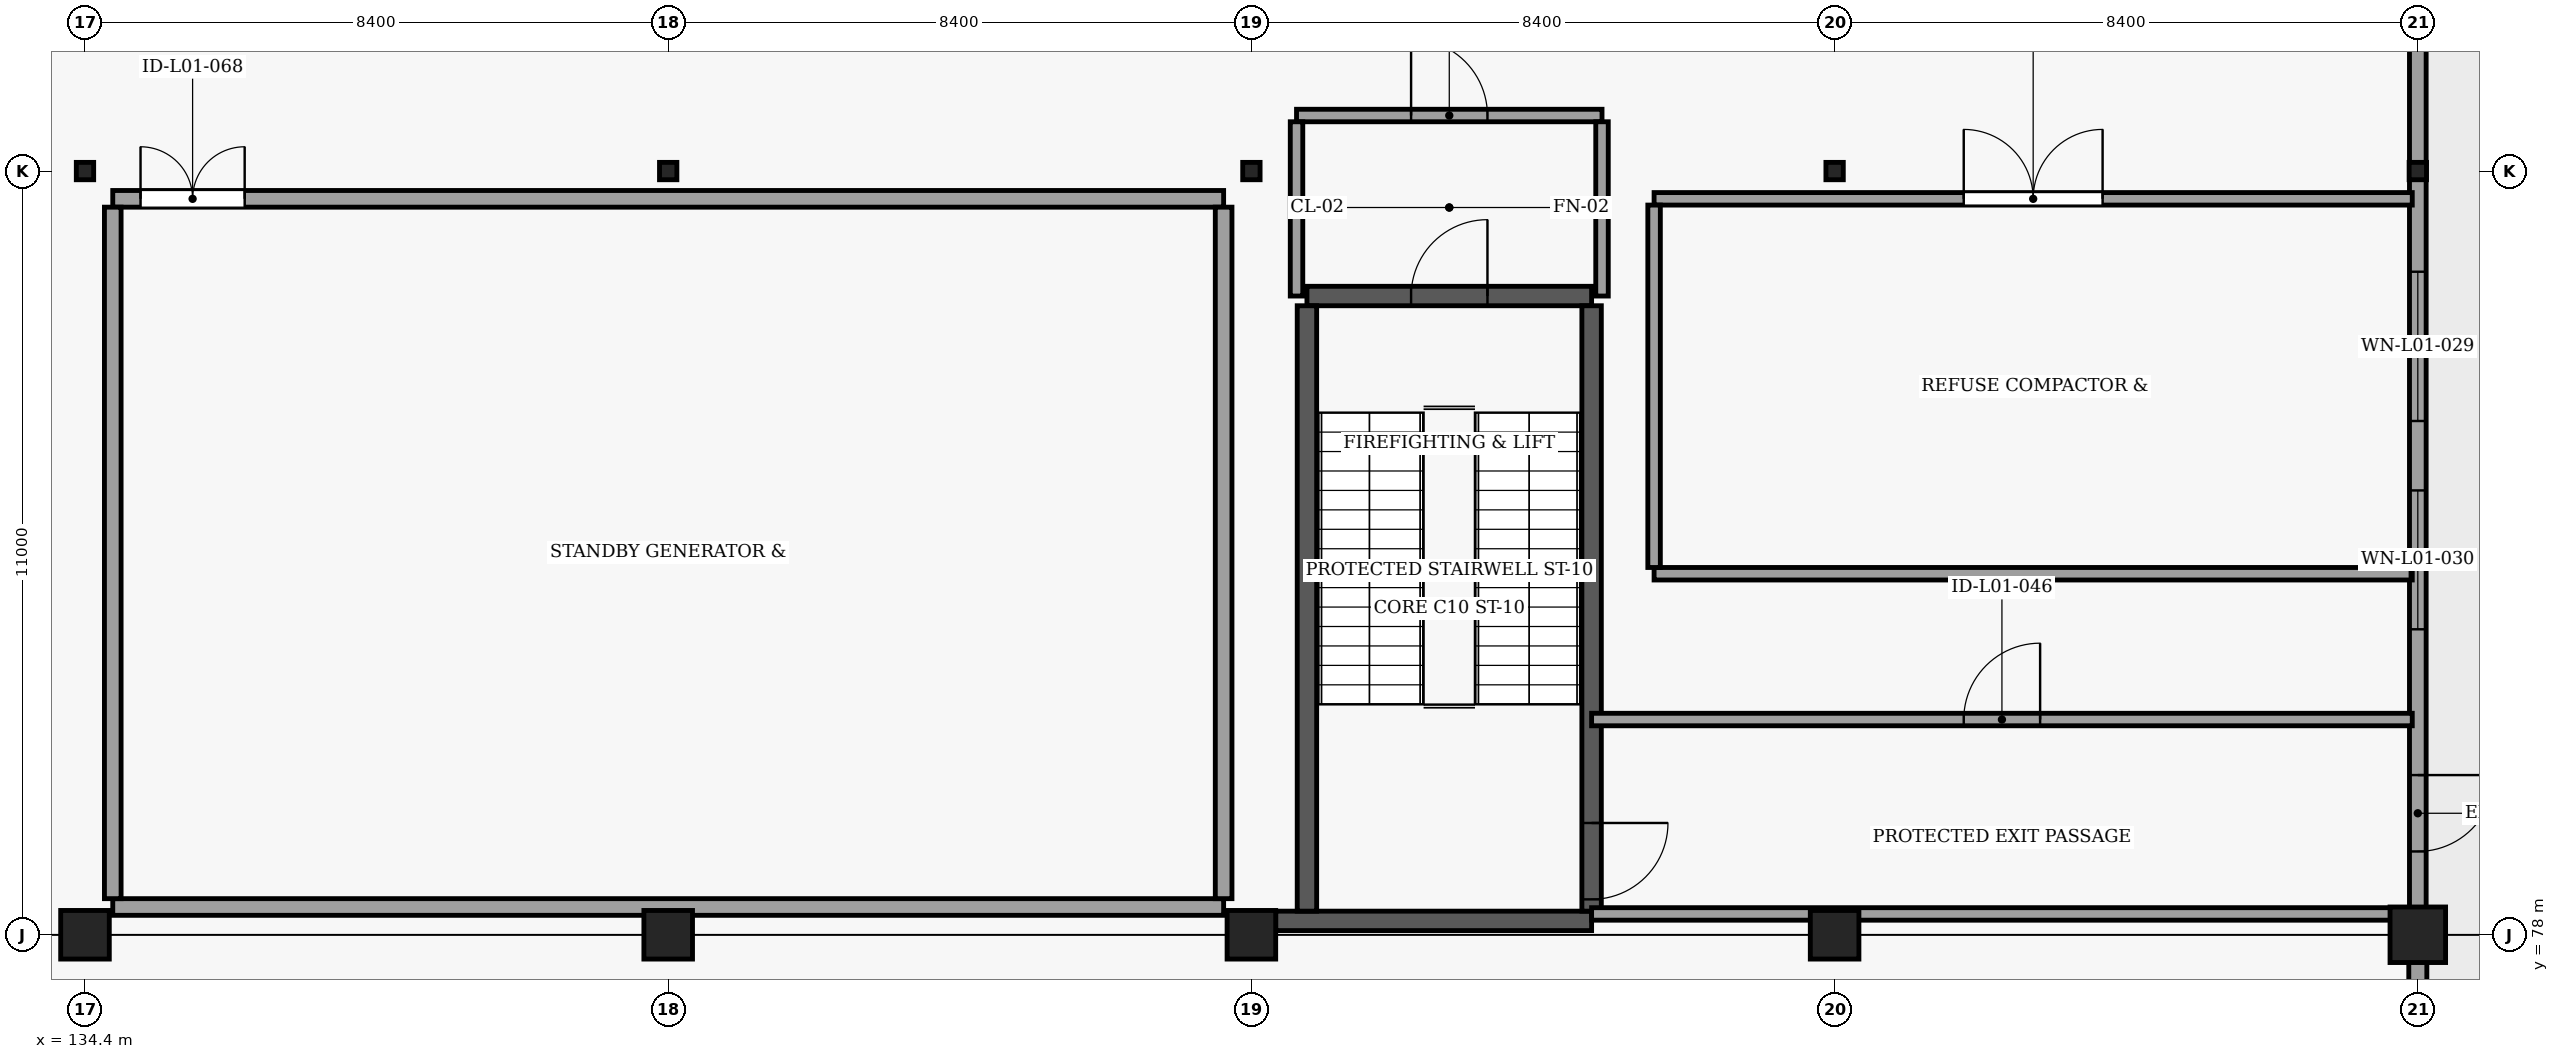
"""IFC4 building model, lengths in metres.
Left out: names, types, materials, properties, quantities, classifications, styles, units other than length and angle.
Written with IfcOpenShell. Run it as: python <this file> out.ifc"""

import sys

from ifc_helpers import new_model, si_unit, direction, frame, frame_2d, origin, origin_2d, place, context, subcontext, project, spatial, rectangle, hollow_rectangle, extrude, element, fill, save


model = new_model("IFC4")
c1 = context("Model", 3, precision=1e-05, world=origin(), true_north=direction((0.0, 1.0)))
c2 = subcontext(c1, "Body", "Model", "MODEL_VIEW")
j1 = project(units=[si_unit("LENGTHUNIT", "METRE"), si_unit("PLANEANGLEUNIT", "RADIAN")], contexts=[c1])
p1 = place(None, origin())
s1 = spatial("IfcSite", under=j1, at=p1, CompositionType="ELEMENT")
p2 = place(p1, origin())
s2 = spatial("IfcBuilding", under=s1, at=p2, CompositionType="ELEMENT")
p3 = place(p2, origin())
s3 = spatial("IfcBuildingStorey", under=s2, at=p3, CompositionType="ELEMENT", Elevation=0.0)
for number, where, z_axis, x_axis in (
    (1, (134.4, 78.0, -0.45), (0.0, 0.0, 1.0), (1.0, 0.0, 0.0)),
    (2, (142.8, 78.0, -0.45), (0.0, 0.0, 1.0), (1.0, 0.0, 0.0)),
    (3, (151.2, 78.0, -0.45), (0.0, 0.0, 1.0), (1.0, 0.0, 0.0)),
    (4, (159.6, 78.0, -0.45), (0.0, 0.0, 1.0), (1.0, 0.0, 0.0)),
):
    element("IfcColumn", number, at=place(p3, frame(where, z_axis=z_axis, x_axis=x_axis)), inside=s3, PredefinedType="COLUMN", context=c2, shape_type="SweptSolid", body=[
        extrude(rectangle(XDim=0.7, YDim=0.7, at=origin_2d()), origin(), (0.0, 0.0, 1.0), 5.57),
    ])
p4 = place(p3, frame((168.0, 78.0, -0.45), z_axis=(0.0, 0.0, 1.0), x_axis=(1.0, 0.0, 0.0)))
e5 = element("IfcColumn", 5, at=p4, inside=s3, PredefinedType="COLUMN", context=c2, shape_type="SweptSolid", body=[
    extrude(rectangle(XDim=0.8, YDim=0.8, at=origin_2d()), origin(), (0.0, 0.0, 1.0), 5.57),
])
for number, where, z_axis, x_axis in (
    (6, (134.4, 89.0, -0.45), (0.0, 0.0, 1.0), (1.0, 0.0, 0.0)),
    (7, (142.8, 89.0, -0.45), (0.0, 0.0, 1.0), (1.0, 0.0, 0.0)),
    (8, (151.2, 89.0, -0.45), (0.0, 0.0, 1.0), (1.0, 0.0, 0.0)),
    (9, (159.6, 89.0, -0.45), (0.0, 0.0, 1.0), (1.0, 0.0, 0.0)),
    (10, (168.0, 89.0, -0.45), (0.0, 0.0, 1.0), (1.0, 0.0, 0.0)),
):
    element("IfcColumn", number, at=place(p3, frame(where, z_axis=z_axis, x_axis=x_axis)), inside=s3, PredefinedType="COLUMN", context=c2, shape_type="SweptSolid", body=[
        extrude(hollow_rectangle(XDim=0.25, YDim=0.25, WallThickness=0.012, InnerFilletRadius=0.012, OuterFilletRadius=0.025, at=origin_2d()), origin(), (0.0, 0.0, 1.0), 5.57),
    ])
p5 = place(p3, frame((151.55, 78.2, -0.45), z_axis=(0.0, 0.0, 1.0), x_axis=(1.0, 0.0, 0.0)))
e11 = element("IfcWall", 11, at=p5, inside=s3, PredefinedType="SHEAR", context=c2, shape_type="SweptSolid", body=[
    extrude(rectangle(XDim=4.55, YDim=0.28, at=frame_2d((2.275, 0.0))), origin(), (0.0, 0.0, 1.0), 5.57),
])
p6 = place(p3, frame((152.0, 87.2, -0.45), z_axis=(0.0, 0.0, 1.0), x_axis=(1.0, 0.0, 0.0)))
e12 = element("IfcWall", 12, at=p6, inside=s3, PredefinedType="SHEAR", context=c2, shape_type="SweptSolid", body=[
    extrude(rectangle(XDim=4.1, YDim=0.28, at=frame_2d((2.05, 0.0))), origin(), (0.0, 0.0, 1.0), 5.57),
])
p7 = place(p6, frame((1.5, 0.0, 0.45)))
e13 = element("IfcOpeningElement", 13, at=p7, cuts=e12, PredefinedType="OPENING", context=c2, shape_type="SweptSolid", body=[
    extrude(rectangle(XDim=1.1, YDim=2.2, at=frame_2d((0.55, 1.1))), frame((0.0, 0.15, 0.0), z_axis=(0.0, -1.0, 0.0), x_axis=(1.0, 0.0, 0.0)), (0.0, 0.0, 1.0), 0.3),
])
p8 = place(p3, frame((152.0, 78.34, -0.45), z_axis=(0.0, 0.0, 1.0), x_axis=(0.0, 1.0, 0.0)))
e14 = element("IfcWall", 14, at=p8, inside=s3, PredefinedType="SHEAR", context=c2, shape_type="SweptSolid", body=[
    extrude(rectangle(XDim=8.72, YDim=0.28, at=frame_2d((4.36, 0.0))), origin(), (0.0, 0.0, 1.0), 5.57),
])
p9 = place(p3, frame((156.1, 87.06, -0.45), z_axis=(0.0, 0.0, 1.0), x_axis=(0.0, -1.0, 0.0)))
e15 = element("IfcWall", 15, at=p9, inside=s3, PredefinedType="SHEAR", context=c2, shape_type="SweptSolid", body=[
    extrude(rectangle(XDim=8.72, YDim=0.28, at=frame_2d((4.36, 0.0))), origin(), (0.0, 0.0, 1.0), 5.57),
])
p10 = place(p9, frame((7.45, 0.0, 0.45)))
e16 = element("IfcOpeningElement", 16, at=p10, cuts=e15, PredefinedType="OPENING", context=c2, shape_type="SweptSolid", body=[
    extrude(rectangle(XDim=1.1, YDim=2.2, at=frame_2d((0.55, 1.1))), frame((0.0, 0.15, 0.0), z_axis=(0.0, -1.0, 0.0), x_axis=(1.0, 0.0, 0.0)), (0.0, 0.0, 1.0), 0.3),
])
p11 = place(p3, frame((168.0, 77.65, 0.0), z_axis=(0.0, 0.0, 1.0), x_axis=(0.0, -1.0, 0.0)))
e17 = element("IfcWall", 17, at=p11, inside=s3, PredefinedType="SOLIDWALL", context=c2, shape_type="SweptSolid", body=[
    extrude(rectangle(XDim=11.3, YDim=0.26, at=frame_2d((5.65, 0.0))), origin(), (0.0, 0.0, 1.0), 4.534),
])
p12 = place(p11, frame((2.85, 0.0, 0.0)))
e18 = element("IfcOpeningElement", 18, at=p12, cuts=e17, PredefinedType="OPENING", context=c2, shape_type="SweptSolid", body=[
    extrude(rectangle(XDim=3.6, YDim=3.6, at=frame_2d((1.8, 1.8))), frame((0.0, 0.14, 0.0), z_axis=(0.0, -1.0, 0.0), x_axis=(1.0, 0.0, 0.0)), (0.0, 0.0, 1.0), 0.28),
])
p13 = place(p11, frame((8.15, 0.0, 0.0)))
e19 = element("IfcOpeningElement", 19, at=p13, cuts=e17, PredefinedType="OPENING", context=c2, shape_type="SweptSolid", body=[
    extrude(rectangle(XDim=1.1, YDim=2.2, at=frame_2d((0.55, 1.1))), frame((0.0, 0.14, 0.0), z_axis=(0.0, -1.0, 0.0), x_axis=(1.0, 0.0, 0.0)), (0.0, 0.0, 1.0), 0.28),
])
p14 = place(p3, frame((168.0, 89.122, 0.0), z_axis=(0.0, 0.0, 1.0), x_axis=(0.0, -1.0, 0.0)))
e20 = element("IfcWall", 20, at=p14, inside=s3, PredefinedType="ELEMENTEDWALL", context=c2, shape_type="SweptSolid", body=[
    extrude(rectangle(XDim=10.822, YDim=0.24, at=frame_2d((5.411, 0.0))), origin(), (0.0, 0.0, 1.0), 4.701),
])
p15 = place(p14, frame((1.572, 0.0, 1.4)))
e21 = element("IfcOpeningElement", 21, at=p15, cuts=e20, PredefinedType="OPENING", context=c2, shape_type="SweptSolid", body=[
    extrude(rectangle(XDim=2.15, YDim=1.25, at=frame_2d((1.075, 0.625))), frame((0.0, 0.13, 0.0), z_axis=(0.0, -1.0, 0.0), x_axis=(1.0, 0.0, 0.0)), (0.0, 0.0, 1.0), 0.26),
])
p16 = place(p14, frame((4.722, 0.0, 1.4)))
e22 = element("IfcOpeningElement", 22, at=p16, cuts=e20, PredefinedType="OPENING", context=c2, shape_type="SweptSolid", body=[
    extrude(rectangle(XDim=2.0, YDim=1.2, at=frame_2d((1.0, 0.6))), frame((0.0, 0.13, 0.0), z_axis=(0.0, -1.0, 0.0), x_axis=(1.0, 0.0, 0.0)), (0.0, 0.0, 1.0), 0.26),
])
p17 = place(p14, frame((8.822, 0.0, 0.0)))
e23 = element("IfcOpeningElement", 23, at=p17, cuts=e20, PredefinedType="OPENING", context=c2, shape_type="SweptSolid", body=[
    extrude(rectangle(XDim=1.1, YDim=2.2, at=frame_2d((0.55, 1.1))), frame((0.0, 0.13, 0.0), z_axis=(0.0, -1.0, 0.0), x_axis=(1.0, 0.0, 0.0)), (0.0, 0.0, 1.0), 0.26),
])
p18 = place(p3, frame((168.0, 89.11, 0.0), z_axis=(0.0, 0.0, 1.0), x_axis=(0.0, 1.0, 0.0)))
e24 = element("IfcWall", 24, at=p18, inside=s3, PredefinedType="ELEMENTEDWALL", context=c2, shape_type="SweptSolid", body=[
    extrude(rectangle(XDim=11.012, YDim=0.24, at=frame_2d((5.506, 0.0))), origin(), (0.0, 0.0, 1.0), 4.701),
])
p19 = place(p18, frame((2.39, 0.0, 1.4)))
e25 = element("IfcOpeningElement", 25, at=p19, cuts=e24, PredefinedType="OPENING", context=c2, shape_type="SweptSolid", body=[
    extrude(rectangle(XDim=2.0, YDim=1.2, at=frame_2d((1.0, 0.6))), frame((0.0, 0.13, 0.0), z_axis=(0.0, -1.0, 0.0), x_axis=(1.0, 0.0, 0.0)), (0.0, 0.0, 1.0), 0.26),
])
p20 = place(p18, frame((6.29, 0.0, 1.4)))
e26 = element("IfcOpeningElement", 26, at=p20, cuts=e24, PredefinedType="OPENING", context=c2, shape_type="SweptSolid", body=[
    extrude(rectangle(XDim=2.15, YDim=1.25, at=frame_2d((1.075, 0.625))), frame((0.0, 0.13, 0.0), z_axis=(0.0, -1.0, 0.0), x_axis=(1.0, 0.0, 0.0)), (0.0, 0.0, 1.0), 0.26),
])
p21 = place(p3, frame((151.85, 89.8, 0.0), z_axis=(0.0, 0.0, 1.0), x_axis=(1.0, 0.0, 0.0)))
e27 = element("IfcWall", 27, at=p21, inside=s3, PredefinedType="SOLIDWALL", context=c2, shape_type="SweptSolid", body=[
    extrude(rectangle(XDim=4.4, YDim=0.18, at=frame_2d((2.2, 0.0))), origin(), (0.0, 0.0, 1.0), 5.1),
])
p22 = place(p21, frame((1.65, 0.0, 0.0)))
e28 = element("IfcOpeningElement", 28, at=p22, cuts=e27, PredefinedType="OPENING", context=c2, shape_type="SweptSolid", body=[
    extrude(rectangle(XDim=1.1, YDim=2.2, at=frame_2d((0.55, 1.1))), frame((0.0, 0.1, 0.0), z_axis=(0.0, -1.0, 0.0), x_axis=(1.0, 0.0, 0.0)), (0.0, 0.0, 1.0), 0.2),
])
for number, where, z_axis, x_axis in (
    (29, (151.85, 87.2, 0.0), (0.0, 0.0, 1.0), (0.0, 1.0, 0.0)),
    (30, (156.25, 87.2, 0.0), (0.0, 0.0, 1.0), (0.0, 1.0, 0.0)),
):
    element("IfcWall", number, at=place(p3, frame(where, z_axis=z_axis, x_axis=x_axis)), inside=s3, PredefinedType="SOLIDWALL", context=c2, shape_type="SweptSolid", body=[
        extrude(rectangle(XDim=2.51, YDim=0.18, at=frame_2d((1.255, 0.0))), origin(), (0.0, 0.0, 1.0), 4.66),
    ])
p23 = place(p3, frame((156.1, 78.3, 0.0), z_axis=(0.0, 0.0, 1.0), x_axis=(1.0, 0.0, 0.0)))
e31 = element("IfcWall", 31, at=p23, inside=s3, PredefinedType="SOLIDWALL", context=c2, shape_type="SweptSolid", body=[
    extrude(rectangle(XDim=11.82, YDim=0.18, at=frame_2d((5.91, 0.0))), origin(), (0.0, 0.0, 1.0), 4.387),
])
p24 = place(p3, frame((156.1, 81.1, 0.0), z_axis=(0.0, 0.0, 1.0), x_axis=(1.0, 0.0, 0.0)))
e32 = element("IfcWall", 32, at=p24, inside=s3, PredefinedType="SOLIDWALL", context=c2, shape_type="SweptSolid", body=[
    extrude(rectangle(XDim=11.82, YDim=0.18, at=frame_2d((5.91, 0.0))), origin(), (0.0, 0.0, 1.0), 4.703),
])
p25 = place(p24, frame((5.36, 0.0, 0.0)))
e33 = element("IfcOpeningElement", 33, at=p25, cuts=e32, PredefinedType="OPENING", context=c2, shape_type="SweptSolid", body=[
    extrude(rectangle(XDim=1.1, YDim=2.2, at=frame_2d((0.55, 1.1))), frame((0.0, 0.1, 0.0), z_axis=(0.0, -1.0, 0.0), x_axis=(1.0, 0.0, 0.0)), (0.0, 0.0, 1.0), 0.2),
])
p26 = place(p3, frame((134.8, 78.4, 0.0), z_axis=(0.0, 0.0, 1.0), x_axis=(1.0, 0.0, 0.0)))
e34 = element("IfcWall", 34, at=p26, inside=s3, PredefinedType="SOLIDWALL", context=c2, shape_type="SweptSolid", body=[
    extrude(rectangle(XDim=16.0, YDim=0.24, at=frame_2d((8.0, 0.0))), origin(), (0.0, 0.0, 1.0), 4.703),
])
p27 = place(p3, frame((134.8, 88.6, 0.0), z_axis=(0.0, 0.0, 1.0), x_axis=(1.0, 0.0, 0.0)))
e35 = element("IfcWall", 35, at=p27, inside=s3, PredefinedType="SOLIDWALL", context=c2, shape_type="SweptSolid", body=[
    extrude(rectangle(XDim=16.0, YDim=0.24, at=frame_2d((8.0, 0.0))), origin(), (0.0, 0.0, 1.0), 4.703),
])
p28 = place(p27, frame((0.4, 0.0, 0.0)))
e36 = element("IfcOpeningElement", 36, at=p28, cuts=e35, PredefinedType="OPENING", context=c2, shape_type="SweptSolid", body=[
    extrude(rectangle(XDim=1.5, YDim=2.25, at=frame_2d((0.75, 1.125))), frame((0.0, 0.13, 0.0), z_axis=(0.0, -1.0, 0.0), x_axis=(1.0, 0.0, 0.0)), (0.0, 0.0, 1.0), 0.26),
])
for number, where, z_axis, x_axis in (
    (37, (134.8, 78.52, 0.0), (0.0, 0.0, 1.0), (0.0, 1.0, 0.0)),
    (38, (150.8, 78.52, 0.0), (0.0, 0.0, 1.0), (0.0, 1.0, 0.0)),
):
    element("IfcWall", number, at=place(p3, frame(where, z_axis=z_axis, x_axis=x_axis)), inside=s3, PredefinedType="SOLIDWALL", context=c2, shape_type="SweptSolid", body=[
        extrude(rectangle(XDim=9.96, YDim=0.24, at=frame_2d((4.98, 0.0))), origin(), (0.0, 0.0, 1.0), 4.807),
    ])
p29 = place(p3, frame((157.0, 83.2, 0.0), z_axis=(0.0, 0.0, 1.0), x_axis=(1.0, 0.0, 0.0)))
e39 = element("IfcWall", 39, at=p29, inside=s3, PredefinedType="SOLIDWALL", context=c2, shape_type="SweptSolid", body=[
    extrude(rectangle(XDim=10.92, YDim=0.18, at=frame_2d((5.46, 0.0))), origin(), (0.0, 0.0, 1.0), 4.703),
])
p30 = place(p3, frame((157.0, 88.6, 0.0), z_axis=(0.0, 0.0, 1.0), x_axis=(1.0, 0.0, 0.0)))
e40 = element("IfcWall", 40, at=p30, inside=s3, PredefinedType="SOLIDWALL", context=c2, shape_type="SweptSolid", body=[
    extrude(rectangle(XDim=10.92, YDim=0.18, at=frame_2d((5.46, 0.0))), origin(), (0.0, 0.0, 1.0), 4.703),
])
p31 = place(p30, frame((4.46, 0.0, 0.0)))
e41 = element("IfcOpeningElement", 41, at=p31, cuts=e40, PredefinedType="OPENING", context=c2, shape_type="SweptSolid", body=[
    extrude(rectangle(XDim=2.0, YDim=2.3, at=frame_2d((1.0, 1.15))), frame((0.0, 0.1, 0.0), z_axis=(0.0, -1.0, 0.0), x_axis=(1.0, 0.0, 0.0)), (0.0, 0.0, 1.0), 0.2),
])
p32 = place(p3, frame((157.0, 83.29, 0.0), z_axis=(0.0, 0.0, 1.0), x_axis=(0.0, 1.0, 0.0)))
e42 = element("IfcWall", 42, at=p32, inside=s3, PredefinedType="SOLIDWALL", context=c2, shape_type="SweptSolid", body=[
    extrude(rectangle(XDim=5.22, YDim=0.18, at=frame_2d((2.61, 0.0))), origin(), (0.0, 0.0, 1.0), 5.1),
])
p33 = place(p7, origin())
e43 = element("IfcDoor", 43, at=p33, inside=s3, OperationType="SINGLE_SWING_RIGHT", PredefinedType="DOOR", context=c2, shape_type="SweptSolid", body=[
    extrude(rectangle(XDim=1.1, YDim=2.2, at=frame_2d((0.55, 1.1))), frame((0.0, 0.025, 0.0), z_axis=(0.0, -1.0, 0.0), x_axis=(1.0, 0.0, 0.0)), (0.0, 0.0, 1.0), 0.05),
])
fill(e13, e43)
p34 = place(p10, origin())
e44 = element("IfcDoor", 44, at=p34, inside=s3, OperationType="SINGLE_SWING_LEFT", PredefinedType="DOOR", context=c2, shape_type="SweptSolid", body=[
    extrude(rectangle(XDim=1.1, YDim=2.2, at=frame_2d((0.55, 1.1))), frame((0.0, 0.025, 0.0), z_axis=(0.0, -1.0, 0.0), x_axis=(1.0, 0.0, 0.0)), (0.0, 0.0, 1.0), 0.05),
])
fill(e16, e44)
p35 = place(p15, origin())
e45 = element("IfcWindow", 45, at=p35, inside=s3, PartitioningType="SINGLE_PANEL", PredefinedType="WINDOW", context=c2, shape_type="SweptSolid", body=[
    extrude(rectangle(XDim=2.15, YDim=1.25, at=frame_2d((1.075, 0.625))), frame((0.0, 0.03, 0.0), z_axis=(0.0, -1.0, 0.0), x_axis=(1.0, 0.0, 0.0)), (0.0, 0.0, 1.0), 0.06),
])
fill(e21, e45)
p36 = place(p16, origin())
e46 = element("IfcWindow", 46, at=p36, inside=s3, PartitioningType="SINGLE_PANEL", PredefinedType="WINDOW", context=c2, shape_type="SweptSolid", body=[
    extrude(rectangle(XDim=2.0, YDim=1.2, at=frame_2d((1.0, 0.6))), frame((0.0, 0.03, 0.0), z_axis=(0.0, -1.0, 0.0), x_axis=(1.0, 0.0, 0.0)), (0.0, 0.0, 1.0), 0.06),
])
fill(e22, e46)
p37 = place(p17, origin())
e47 = element("IfcDoor", 47, at=p37, inside=s3, OperationType="SINGLE_SWING_LEFT", PredefinedType="DOOR", context=c2, shape_type="SweptSolid", body=[
    extrude(rectangle(XDim=1.1, YDim=2.2, at=frame_2d((0.55, 1.1))), frame((0.0, 0.025, 0.0), z_axis=(0.0, -1.0, 0.0), x_axis=(1.0, 0.0, 0.0)), (0.0, 0.0, 1.0), 0.05),
])
fill(e23, e47)
p38 = place(p22, origin())
e48 = element("IfcDoor", 48, at=p38, inside=s3, OperationType="SINGLE_SWING_LEFT", PredefinedType="DOOR", context=c2, shape_type="SweptSolid", body=[
    extrude(rectangle(XDim=1.1, YDim=2.2, at=frame_2d((0.55, 1.1))), frame((0.0, 0.025, 0.0), z_axis=(0.0, -1.0, 0.0), x_axis=(1.0, 0.0, 0.0)), (0.0, 0.0, 1.0), 0.05),
])
fill(e28, e48)
p39 = place(p25, origin())
e49 = element("IfcDoor", 49, at=p39, inside=s3, OperationType="SINGLE_SWING_RIGHT", PredefinedType="DOOR", context=c2, shape_type="SweptSolid", body=[
    extrude(rectangle(XDim=1.1, YDim=2.2, at=frame_2d((0.55, 1.1))), frame((0.0, 0.025, 0.0), z_axis=(0.0, -1.0, 0.0), x_axis=(1.0, 0.0, 0.0)), (0.0, 0.0, 1.0), 0.05),
])
fill(e33, e49)
p40 = place(p28, origin())
e50 = element("IfcDoor", 50, at=p40, inside=s3, OperationType="DOUBLE_DOOR_SINGLE_SWING", PredefinedType="DOOR", context=c2, shape_type="SweptSolid", body=[
    extrude(rectangle(XDim=1.5, YDim=2.25, at=frame_2d((0.75, 1.125))), frame((0.0, 0.025, 0.0), z_axis=(0.0, -1.0, 0.0), x_axis=(1.0, 0.0, 0.0)), (0.0, 0.0, 1.0), 0.05),
])
fill(e36, e50)
p41 = place(p31, origin())
e51 = element("IfcDoor", 51, at=p41, inside=s3, OperationType="DOUBLE_DOOR_SINGLE_SWING", PredefinedType="DOOR", context=c2, shape_type="SweptSolid", body=[
    extrude(rectangle(XDim=2.0, YDim=2.3, at=frame_2d((1.0, 1.15))), frame((0.0, 0.025, 0.0), z_axis=(0.0, -1.0, 0.0), x_axis=(1.0, 0.0, 0.0)), (0.0, 0.0, 1.0), 0.05),
])
fill(e41, e51)
save(model, sys.argv[1])
